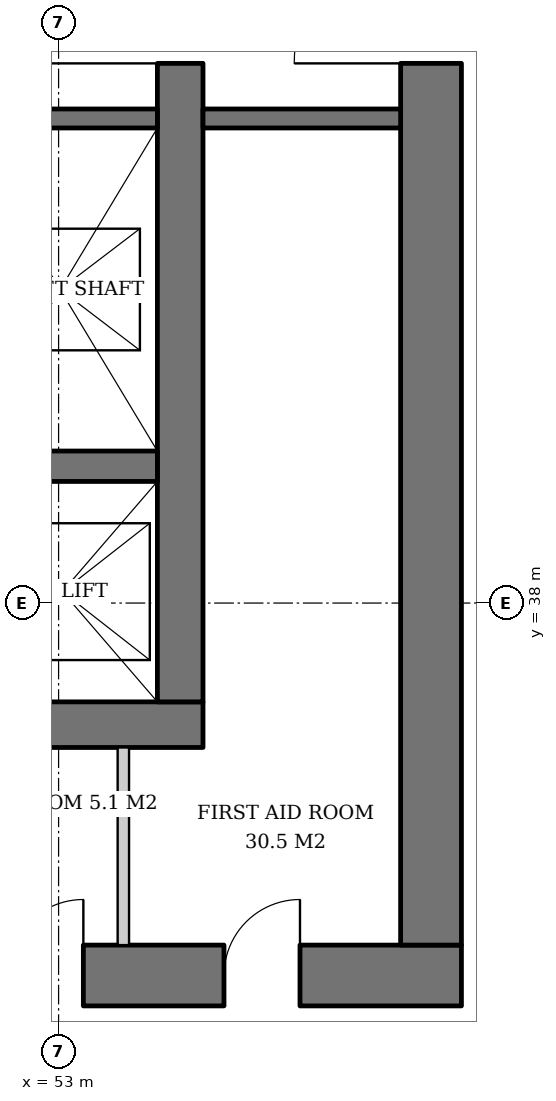
"""IFC4 building model, lengths in metres.
Left out: names, types, materials, properties, quantities, classifications, styles, units other than length and angle.
Written with IfcOpenShell. Run it as: python <this file> out.ifc"""

import sys

from ifc_helpers import new_model, si_unit, direction, frame, frame_2d, origin, place, context, subcontext, project, spatial, rectangle, extrude, element, fill, save


model = new_model("IFC4")
c1 = context("Model", 3, precision=1e-05, world=origin(), true_north=direction((0.0, 1.0)))
c2 = subcontext(c1, "Body", "Model", "MODEL_VIEW")
j1 = project(units=[si_unit("LENGTHUNIT", "METRE"), si_unit("PLANEANGLEUNIT", "RADIAN")], contexts=[c1])
p1 = place(None, origin())
s1 = spatial("IfcSite", under=j1, at=p1, CompositionType="ELEMENT")
p2 = place(p1, origin())
s2 = spatial("IfcBuilding", under=s1, at=p2, CompositionType="ELEMENT")
p3 = place(p2, frame((0.0, 0.0, 55.2)))
s3 = spatial("IfcBuildingStorey", under=s2, at=p3, CompositionType="ELEMENT", Elevation=55.2)
p4 = place(p3, frame((35.1, 36.4, 0.0), z_axis=(0.0, 0.0, 1.0), x_axis=(1.0, 0.0, 0.0)))
e1 = element("IfcWall", 1, at=p4, inside=s3, PredefinedType="SHEAR", context=c2, shape_type="SweptSolid", body=[
    extrude(rectangle(XDim=19.8, YDim=0.6, at=frame_2d((9.9, 0.0))), origin(), (0.0, 0.0, 1.0), 3.8),
])
p5 = place(p4, frame((3.9, 0.0, 0.0)))
e2 = element("IfcOpeningElement", 2, at=p5, cuts=e1, PredefinedType="OPENING", context=c2, shape_type="SweptSolid", body=[
    extrude(rectangle(XDim=1.0, YDim=2.1, at=frame_2d((0.5, 1.05))), frame((0.0, 0.31, 0.0), z_axis=(0.0, -1.0, 0.0), x_axis=(1.0, 0.0, 0.0)), (0.0, 0.0, 1.0), 0.62),
])
p6 = place(p4, frame((15.35, 0.0, 0.0)))
e3 = element("IfcOpeningElement", 3, at=p6, cuts=e1, PredefinedType="OPENING", context=c2, shape_type="SweptSolid", body=[
    extrude(rectangle(XDim=1.0, YDim=2.1, at=frame_2d((0.5, 1.05))), frame((0.0, 0.31, 0.0), z_axis=(0.0, -1.0, 0.0), x_axis=(1.0, 0.0, 0.0)), (0.0, 0.0, 1.0), 0.62),
])
p7 = place(p3, frame((54.6, 36.7, 0.0), z_axis=(0.0, 0.0, 1.0), x_axis=(0.0, 1.0, 0.0)))
e4 = element("IfcWall", 4, at=p7, inside=s3, PredefinedType="SHEAR", context=c2, shape_type="SweptSolid", body=[
    extrude(rectangle(XDim=18.6, YDim=0.6, at=frame_2d((9.3, 0.0))), origin(), (0.0, 0.0, 1.0), 3.8),
])
p8 = place(p7, frame((8.4, 0.0, 0.0)))
e5 = element("IfcOpeningElement", 5, at=p8, cuts=e4, PredefinedType="OPENING", context=c2, shape_type="SweptSolid", body=[
    extrude(rectangle(XDim=1.8, YDim=2.4, at=frame_2d((0.9, 1.2))), frame((0.0, 0.31, 0.0), z_axis=(0.0, -1.0, 0.0), x_axis=(1.0, 0.0, 0.0)), (0.0, 0.0, 1.0), 0.62),
])
p9 = place(p3, frame((31.7, 33.1, 0.0), z_axis=(0.0, 0.0, 1.0), x_axis=(1.0, 0.0, 0.0)))
e6 = element("IfcWall", 6, at=p9, inside=s3, PredefinedType="SHEAR", context=c2, shape_type="SweptSolid", body=[
    extrude(rectangle(XDim=26.6, YDim=0.8, at=frame_2d((13.3, 0.0))), origin(), (0.0, 0.0, 1.0), 3.8),
])
p10 = place(p9, frame((7.3, 0.0, 0.0)))
e7 = element("IfcOpeningElement", 7, at=p10, cuts=e6, PredefinedType="OPENING", context=c2, shape_type="SweptSolid", body=[
    extrude(rectangle(XDim=1.0, YDim=2.1, at=frame_2d((0.5, 1.05))), frame((0.0, 0.41, 0.0), z_axis=(0.0, -1.0, 0.0), x_axis=(1.0, 0.0, 0.0)), (0.0, 0.0, 1.0), 0.82),
])
p11 = place(p9, frame((18.75, 0.0, 0.0)))
e8 = element("IfcOpeningElement", 8, at=p11, cuts=e6, PredefinedType="OPENING", context=c2, shape_type="SweptSolid", body=[
    extrude(rectangle(XDim=1.0, YDim=2.1, at=frame_2d((0.5, 1.05))), frame((0.0, 0.41, 0.0), z_axis=(0.0, -1.0, 0.0), x_axis=(1.0, 0.0, 0.0)), (0.0, 0.0, 1.0), 0.82),
])
p12 = place(p9, frame((1.9, 0.0, 0.0)))
e9 = element("IfcOpeningElement", 9, at=p12, cuts=e6, PredefinedType="OPENING", context=c2, shape_type="SweptSolid", body=[
    extrude(rectangle(XDim=1.0, YDim=2.1, at=frame_2d((0.5, 1.05))), frame((0.0, 0.41, 0.0), z_axis=(0.0, -1.0, 0.0), x_axis=(1.0, 0.0, 0.0)), (0.0, 0.0, 1.0), 0.82),
])
p13 = place(p9, frame((4.725, 0.0, 0.0)))
e10 = element("IfcOpeningElement", 10, at=p13, cuts=e6, PredefinedType="OPENING", context=c2, shape_type="SweptSolid", body=[
    extrude(rectangle(XDim=1.0, YDim=2.1, at=frame_2d((0.5, 1.05))), frame((0.0, 0.41, 0.0), z_axis=(0.0, -1.0, 0.0), x_axis=(1.0, 0.0, 0.0)), (0.0, 0.0, 1.0), 0.82),
])
p14 = place(p9, frame((12.44, 0.0, 0.0)))
e11 = element("IfcOpeningElement", 11, at=p14, cuts=e6, PredefinedType="OPENING", context=c2, shape_type="SweptSolid", body=[
    extrude(rectangle(XDim=1.0, YDim=2.1, at=frame_2d((0.5, 1.05))), frame((0.0, 0.41, 0.0), z_axis=(0.0, -1.0, 0.0), x_axis=(1.0, 0.0, 0.0)), (0.0, 0.0, 1.0), 0.82),
])
p15 = place(p9, frame((20.626, 0.0, 0.0)))
e12 = element("IfcOpeningElement", 12, at=p15, cuts=e6, PredefinedType="OPENING", context=c2, shape_type="SweptSolid", body=[
    extrude(rectangle(XDim=1.0, YDim=2.1, at=frame_2d((0.5, 1.05))), frame((0.0, 0.41, 0.0), z_axis=(0.0, -1.0, 0.0), x_axis=(1.0, 0.0, 0.0)), (0.0, 0.0, 1.0), 0.82),
])
p16 = place(p9, frame((23.476, 0.0, 0.0)))
e13 = element("IfcOpeningElement", 13, at=p16, cuts=e6, PredefinedType="OPENING", context=c2, shape_type="SweptSolid", body=[
    extrude(rectangle(XDim=1.0, YDim=2.1, at=frame_2d((0.5, 1.05))), frame((0.0, 0.41, 0.0), z_axis=(0.0, -1.0, 0.0), x_axis=(1.0, 0.0, 0.0)), (0.0, 0.0, 1.0), 0.82),
])
p17 = place(p3, frame((57.9, 33.5, 0.0), z_axis=(0.0, 0.0, 1.0), x_axis=(0.0, 1.0, 0.0)))
e14 = element("IfcWall", 14, at=p17, inside=s3, PredefinedType="SHEAR", context=c2, shape_type="SweptSolid", body=[
    extrude(rectangle(XDim=25.0, YDim=0.8, at=frame_2d((12.5, 0.0))), origin(), (0.0, 0.0, 1.0), 3.8),
])
p18 = place(p17, frame((11.6, 0.0, 0.0)))
e15 = element("IfcOpeningElement", 15, at=p18, cuts=e14, PredefinedType="OPENING", context=c2, shape_type="SweptSolid", body=[
    extrude(rectangle(XDim=1.8, YDim=2.4, at=frame_2d((0.9, 1.2))), frame((0.0, 0.41, 0.0), z_axis=(0.0, -1.0, 0.0), x_axis=(1.0, 0.0, 0.0)), (0.0, 0.0, 1.0), 0.82),
])
p19 = place(p3, frame((35.7, 39.8, 0.0), z_axis=(0.0, 0.0, 1.0), x_axis=(1.0, 0.0, 0.0)))
e16 = element("IfcWall", 16, at=p19, inside=s3, PredefinedType="SHEAR", context=c2, shape_type="SweptSolid", body=[
    extrude(rectangle(XDim=18.6, YDim=0.4, at=frame_2d((9.3, 0.0))), origin(), (0.0, 0.0, 1.0), 3.8),
])
p20 = place(p3, frame((48.93, 44.375, 0.0), z_axis=(0.0, 0.0, 1.0), x_axis=(1.0, 0.0, 0.0)))
e17 = element("IfcWall", 17, at=p20, inside=s3, PredefinedType="SHEAR", context=c2, shape_type="SweptSolid", body=[
    extrude(rectangle(XDim=5.37, YDim=0.25, at=frame_2d((2.685, 0.0))), origin(), (0.0, 0.0, 1.0), 3.8),
])
p21 = place(p3, frame((54.9, 44.375, 0.0), z_axis=(0.0, 0.0, 1.0), x_axis=(1.0, 0.0, 0.0)))
e18 = element("IfcWall", 18, at=p21, inside=s3, PredefinedType="SOLIDWALL", context=c2, shape_type="SweptSolid", body=[
    extrude(rectangle(XDim=2.6, YDim=0.25, at=frame_2d((1.3, 0.0))), origin(), (0.0, 0.0, 1.0), 3.62),
])
p22 = place(p3, frame((53.852, 33.5, 0.0), z_axis=(0.0, 0.0, 1.0), x_axis=(0.0, 1.0, 0.0)))
e19 = element("IfcWall", 19, at=p22, inside=s3, PredefinedType="SOLIDWALL", context=c2, shape_type="SweptSolid", body=[
    extrude(rectangle(XDim=2.6, YDim=0.15, at=frame_2d((1.3, 0.0))), origin(), (0.0, 0.0, 1.0), 3.62),
])
p23 = place(p8, origin())
e20 = element("IfcDoor", 20, at=p23, inside=s3, OperationType="DOUBLE_DOOR_SINGLE_SWING", PredefinedType="DOOR", context=c2, shape_type="SweptSolid", body=[
    extrude(rectangle(XDim=1.8, YDim=2.4, at=frame_2d((0.9, 1.2))), frame((0.0, 0.025, 0.0), z_axis=(0.0, -1.0, 0.0), x_axis=(1.0, 0.0, 0.0)), (0.0, 0.0, 1.0), 0.05),
])
fill(e5, e20)
p24 = place(p18, origin())
e21 = element("IfcDoor", 21, at=p24, inside=s3, OperationType="DOUBLE_DOOR_SINGLE_SWING", PredefinedType="DOOR", context=c2, shape_type="SweptSolid", body=[
    extrude(rectangle(XDim=1.8, YDim=2.4, at=frame_2d((0.9, 1.2))), frame((0.0, 0.025, 0.0), z_axis=(0.0, -1.0, 0.0), x_axis=(1.0, 0.0, 0.0)), (0.0, 0.0, 1.0), 0.05),
])
fill(e15, e21)
p25 = place(p15, origin())
e22 = element("IfcDoor", 22, at=p25, inside=s3, OperationType="SINGLE_SWING_RIGHT", PredefinedType="DOOR", context=c2, shape_type="SweptSolid", body=[
    extrude(rectangle(XDim=1.0, YDim=2.1, at=frame_2d((0.5, 1.05))), frame((0.0, 0.39, 0.0), z_axis=(0.0, -1.0, 0.0), x_axis=(1.0, 0.0, 0.0)), (0.0, 0.0, 1.0), 0.05),
])
fill(e12, e22)
p26 = place(p16, origin())
e23 = element("IfcDoor", 23, at=p26, inside=s3, OperationType="SINGLE_SWING_RIGHT", PredefinedType="DOOR", context=c2, shape_type="SweptSolid", body=[
    extrude(rectangle(XDim=1.0, YDim=2.1, at=frame_2d((0.5, 1.05))), frame((0.0, 0.39, 0.0), z_axis=(0.0, -1.0, 0.0), x_axis=(1.0, 0.0, 0.0)), (0.0, 0.0, 1.0), 0.05),
])
fill(e13, e23)
save(model, sys.argv[1])
